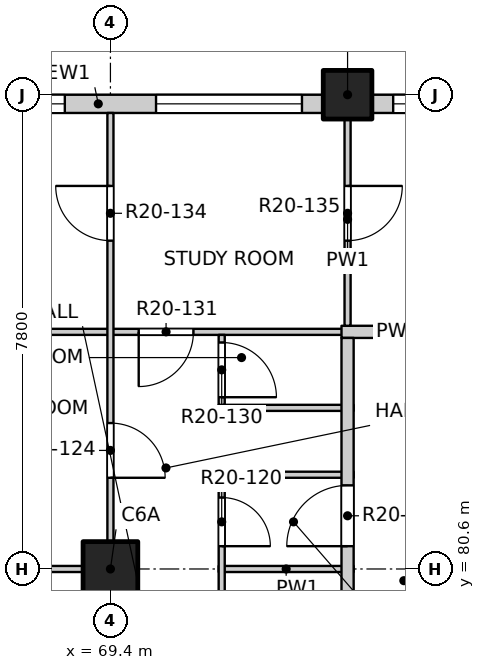
"""IFC4 building model, lengths in metres.
Left out: names, types, materials, properties, quantities, classifications, styles, units other than length and angle.
Written with IfcOpenShell. Run it as: python <this file> out.ifc"""

import sys

from ifc_helpers import new_model, si_unit, direction, frame, frame_2d, origin, origin_2d, place, context, subcontext, project, spatial, rectangle, extrude, element, fill, save


model = new_model("IFC4")
c1 = context("Model", 3, precision=1e-05, world=origin(), true_north=direction((0.0, 1.0)))
c2 = subcontext(c1, "Body", "Model", "MODEL_VIEW")
j1 = project(units=[si_unit("LENGTHUNIT", "METRE"), si_unit("PLANEANGLEUNIT", "RADIAN")], contexts=[c1])
p1 = place(None, origin())
s1 = spatial("IfcSite", under=j1, at=p1, CompositionType="ELEMENT")
p2 = place(p1, origin())
s2 = spatial("IfcBuilding", under=s1, at=p2, CompositionType="ELEMENT")
p3 = place(p2, frame((0.0, 0.0, 204.1)))
s3 = spatial("IfcBuildingStorey", under=s2, at=p3, CompositionType="ELEMENT", Elevation=204.1)
p4 = place(p3, frame((73.3, 88.4, -0.25), z_axis=(0.0, 0.0, 1.0), x_axis=(1.0, 0.0, 0.0)))
e1 = element("IfcColumn", 1, at=p4, inside=s3, PredefinedType="COLUMN", context=c2, shape_type="SweptSolid", body=[
    extrude(rectangle(XDim=0.8, YDim=0.8, at=origin_2d()), origin(), (0.0, 0.0, 1.0), 3.4),
])
p5 = place(p3, frame((69.4, 80.6, -0.25), z_axis=(0.0, 0.0, 1.0), x_axis=(1.0, 0.0, 0.0)))
e2 = element("IfcColumn", 2, at=p5, inside=s3, PredefinedType="COLUMN", context=c2, shape_type="SweptSolid", body=[
    extrude(rectangle(XDim=0.9, YDim=0.9, at=origin_2d()), origin(), (0.0, 0.0, 1.0), 3.4),
])
p6 = place(p3, frame((65.5, 88.25, 0.0), z_axis=(0.0, 0.0, 1.0), x_axis=(1.0, 0.0, 0.0)))
e3 = element("IfcWall", 3, at=p6, inside=s3, PredefinedType="SOLIDWALL", context=c2, shape_type="SweptSolid", body=[
    extrude(rectangle(XDim=7.4, YDim=0.3, at=frame_2d((3.7, 0.0))), origin(), (0.0, 0.0, 1.0), 2.7),
])
p7 = place(p6, frame((0.75, 0.0, 0.9)))
e4 = element("IfcOpeningElement", 4, at=p7, cuts=e3, PredefinedType="OPENING", context=c2, shape_type="SweptSolid", body=[
    extrude(rectangle(XDim=2.4, YDim=1.8, at=frame_2d((1.2, 0.9))), frame((0.0, 0.16, 0.0), z_axis=(0.0, -1.0, 0.0), x_axis=(1.0, 0.0, 0.0)), (0.0, 0.0, 1.0), 0.32),
])
p8 = place(p6, frame((4.65, 0.0, 0.9)))
e5 = element("IfcOpeningElement", 5, at=p8, cuts=e3, PredefinedType="OPENING", context=c2, shape_type="SweptSolid", body=[
    extrude(rectangle(XDim=2.4, YDim=1.8, at=frame_2d((1.2, 0.9))), frame((0.0, 0.16, 0.0), z_axis=(0.0, -1.0, 0.0), x_axis=(1.0, 0.0, 0.0)), (0.0, 0.0, 1.0), 0.32),
])
p9 = place(p3, frame((73.7, 88.25, 0.0), z_axis=(0.0, 0.0, 1.0), x_axis=(1.0, 0.0, 0.0)))
e6 = element("IfcWall", 6, at=p9, inside=s3, PredefinedType="SOLIDWALL", context=c2, shape_type="SweptSolid", body=[
    extrude(rectangle(XDim=22.6, YDim=0.3, at=frame_2d((11.3, 0.0))), origin(), (0.0, 0.0, 1.0), 2.7),
])
p10 = place(p9, frame((0.35, 0.0, 0.9)))
e7 = element("IfcOpeningElement", 7, at=p10, cuts=e6, PredefinedType="OPENING", context=c2, shape_type="SweptSolid", body=[
    extrude(rectangle(XDim=2.4, YDim=1.8, at=frame_2d((1.2, 0.9))), frame((0.0, 0.16, 0.0), z_axis=(0.0, -1.0, 0.0), x_axis=(1.0, 0.0, 0.0)), (0.0, 0.0, 1.0), 0.32),
])
p11 = place(p9, frame((4.25, 0.0, 0.9)))
e8 = element("IfcOpeningElement", 8, at=p11, cuts=e6, PredefinedType="OPENING", context=c2, shape_type="SweptSolid", body=[
    extrude(rectangle(XDim=2.4, YDim=1.8, at=frame_2d((1.2, 0.9))), frame((0.0, 0.16, 0.0), z_axis=(0.0, -1.0, 0.0), x_axis=(1.0, 0.0, 0.0)), (0.0, 0.0, 1.0), 0.32),
])
p12 = place(p9, frame((8.15, 0.0, 0.9)))
e9 = element("IfcOpeningElement", 9, at=p12, cuts=e6, PredefinedType="OPENING", context=c2, shape_type="SweptSolid", body=[
    extrude(rectangle(XDim=2.4, YDim=1.8, at=frame_2d((1.2, 0.9))), frame((0.0, 0.16, 0.0), z_axis=(0.0, -1.0, 0.0), x_axis=(1.0, 0.0, 0.0)), (0.0, 0.0, 1.0), 0.32),
])
p13 = place(p9, frame((12.05, 0.0, 0.9)))
e10 = element("IfcOpeningElement", 10, at=p13, cuts=e6, PredefinedType="OPENING", context=c2, shape_type="SweptSolid", body=[
    extrude(rectangle(XDim=2.4, YDim=1.8, at=frame_2d((1.2, 0.9))), frame((0.0, 0.16, 0.0), z_axis=(0.0, -1.0, 0.0), x_axis=(1.0, 0.0, 0.0)), (0.0, 0.0, 1.0), 0.32),
])
p14 = place(p9, frame((15.95, 0.0, 0.9)))
e11 = element("IfcOpeningElement", 11, at=p14, cuts=e6, PredefinedType="OPENING", context=c2, shape_type="SweptSolid", body=[
    extrude(rectangle(XDim=2.4, YDim=1.8, at=frame_2d((1.2, 0.9))), frame((0.0, 0.16, 0.0), z_axis=(0.0, -1.0, 0.0), x_axis=(1.0, 0.0, 0.0)), (0.0, 0.0, 1.0), 0.32),
])
p15 = place(p9, frame((19.85, 0.0, 0.9)))
e12 = element("IfcOpeningElement", 12, at=p15, cuts=e6, PredefinedType="OPENING", context=c2, shape_type="SweptSolid", body=[
    extrude(rectangle(XDim=2.4, YDim=1.8, at=frame_2d((1.2, 0.9))), frame((0.0, 0.16, 0.0), z_axis=(0.0, -1.0, 0.0), x_axis=(1.0, 0.0, 0.0)), (0.0, 0.0, 1.0), 0.32),
])
p16 = place(p3, frame((61.9, 80.6, 0.0), z_axis=(0.0, 0.0, 1.0), x_axis=(1.0, 0.0, 0.0)))
e13 = element("IfcWall", 13, at=p16, inside=s3, PredefinedType="PARTITIONING", context=c2, shape_type="SweptSolid", body=[
    extrude(rectangle(XDim=7.55, YDim=0.1, at=frame_2d((3.775, 0.0))), origin(), (0.0, 0.0, 1.0), 3.15),
])
for number, where, z_axis, x_axis in (
    (14, (71.18, 80.6, 0.0), (0.0, 0.0, 1.0), (1.0, 0.0, 0.0)),
    (15, (71.18, 82.15, 0.0), (0.0, 0.0, 1.0), (1.0, 0.0, 0.0)),
    (16, (71.18, 83.25, 0.0), (0.0, 0.0, 1.0), (1.0, 0.0, 0.0)),
):
    element("IfcWall", number, at=place(p3, frame(where, z_axis=z_axis, x_axis=x_axis)), inside=s3, PredefinedType="PARTITIONING", context=c2, shape_type="SweptSolid", body=[
        extrude(rectangle(XDim=2.22, YDim=0.1, at=frame_2d((1.11, 0.0))), origin(), (0.0, 0.0, 1.0), 3.15),
    ])
p17 = place(p3, frame((61.9, 84.5, 0.0), z_axis=(0.0, 0.0, 1.0), x_axis=(1.0, 0.0, 0.0)))
e17 = element("IfcWall", 17, at=p17, inside=s3, PredefinedType="PARTITIONING", context=c2, shape_type="SweptSolid", body=[
    extrude(rectangle(XDim=11.5, YDim=0.1, at=frame_2d((5.75, 0.0))), origin(), (0.0, 0.0, 1.0), 3.15),
])
p18 = place(p17, frame((7.965, 0.0, 0.0)))
e18 = element("IfcOpeningElement", 18, at=p18, cuts=e17, PredefinedType="OPENING", context=c2, shape_type="SweptSolid", body=[
    extrude(rectangle(XDim=0.9, YDim=2.1, at=frame_2d((0.45, 1.05))), frame((0.0, 0.06, 0.0), z_axis=(0.0, -1.0, 0.0), x_axis=(1.0, 0.0, 0.0)), (0.0, 0.0, 1.0), 0.12),
])
p19 = place(p3, frame((73.2, 84.5, 0.0), z_axis=(0.0, 0.0, 1.0), x_axis=(1.0, 0.0, 0.0)))
e19 = element("IfcWall", 19, at=p19, inside=s3, PredefinedType="PARTITIONING", context=c2, shape_type="SweptSolid", body=[
    extrude(rectangle(XDim=1.85, YDim=0.2, at=frame_2d((0.925, 0.0))), origin(), (0.0, 0.0, 1.0), 3.15),
])
p20 = place(p3, frame((69.4, 41.9, 0.0), z_axis=(0.0, 0.0, 1.0), x_axis=(0.0, 1.0, 0.0)))
e20 = element("IfcWall", 20, at=p20, inside=s3, PredefinedType="PARTITIONING", context=c2, shape_type="SweptSolid", body=[
    extrude(rectangle(XDim=46.2, YDim=0.1, at=frame_2d((23.1, 0.0))), origin(), (0.0, 0.0, 1.0), 3.15),
])
p21 = place(p20, frame((1.2, 0.0, 0.0)))
e21 = element("IfcOpeningElement", 21, at=p21, cuts=e20, PredefinedType="OPENING", context=c2, shape_type="SweptSolid", body=[
    extrude(rectangle(XDim=0.9, YDim=2.1, at=frame_2d((0.45, 1.05))), frame((0.0, 0.06, 0.0), z_axis=(0.0, -1.0, 0.0), x_axis=(1.0, 0.0, 0.0)), (0.0, 0.0, 1.0), 0.12),
])
p22 = place(p20, frame((5.1, 0.0, 0.0)))
e22 = element("IfcOpeningElement", 22, at=p22, cuts=e20, PredefinedType="OPENING", context=c2, shape_type="SweptSolid", body=[
    extrude(rectangle(XDim=0.9, YDim=2.1, at=frame_2d((0.45, 1.05))), frame((0.0, 0.06, 0.0), z_axis=(0.0, -1.0, 0.0), x_axis=(1.0, 0.0, 0.0)), (0.0, 0.0, 1.0), 0.12),
])
p23 = place(p20, frame((9.975, 0.0, 0.0)))
e23 = element("IfcOpeningElement", 23, at=p23, cuts=e20, PredefinedType="OPENING", context=c2, shape_type="SweptSolid", body=[
    extrude(rectangle(XDim=0.9, YDim=2.1, at=frame_2d((0.45, 1.05))), frame((0.0, 0.06, 0.0), z_axis=(0.0, -1.0, 0.0), x_axis=(1.0, 0.0, 0.0)), (0.0, 0.0, 1.0), 0.12),
])
p24 = place(p20, frame((12.9, 0.0, 0.0)))
e24 = element("IfcOpeningElement", 24, at=p24, cuts=e20, PredefinedType="OPENING", context=c2, shape_type="SweptSolid", body=[
    extrude(rectangle(XDim=0.9, YDim=2.1, at=frame_2d((0.45, 1.05))), frame((0.0, 0.06, 0.0), z_axis=(0.0, -1.0, 0.0), x_axis=(1.0, 0.0, 0.0)), (0.0, 0.0, 1.0), 0.12),
])
p25 = place(p20, frame((17.775, 0.0, 0.0)))
e25 = element("IfcOpeningElement", 25, at=p25, cuts=e20, PredefinedType="OPENING", context=c2, shape_type="SweptSolid", body=[
    extrude(rectangle(XDim=0.9, YDim=2.1, at=frame_2d((0.45, 1.05))), frame((0.0, 0.06, 0.0), z_axis=(0.0, -1.0, 0.0), x_axis=(1.0, 0.0, 0.0)), (0.0, 0.0, 1.0), 0.12),
])
p26 = place(p20, frame((21.625, 0.0, 0.0)))
e26 = element("IfcOpeningElement", 26, at=p26, cuts=e20, PredefinedType="OPENING", context=c2, shape_type="SweptSolid", body=[
    extrude(rectangle(XDim=0.9, YDim=2.1, at=frame_2d((0.45, 1.05))), frame((0.0, 0.06, 0.0), z_axis=(0.0, -1.0, 0.0), x_axis=(1.0, 0.0, 0.0)), (0.0, 0.0, 1.0), 0.12),
])
p27 = place(p20, frame((24.6, 0.0, 0.0)))
e27 = element("IfcOpeningElement", 27, at=p27, cuts=e20, PredefinedType="OPENING", context=c2, shape_type="SweptSolid", body=[
    extrude(rectangle(XDim=0.9, YDim=2.1, at=frame_2d((0.45, 1.05))), frame((0.0, 0.06, 0.0), z_axis=(0.0, -1.0, 0.0), x_axis=(1.0, 0.0, 0.0)), (0.0, 0.0, 1.0), 0.12),
])
p28 = place(p20, frame((28.5, 0.0, 0.0)))
e28 = element("IfcOpeningElement", 28, at=p28, cuts=e20, PredefinedType="OPENING", context=c2, shape_type="SweptSolid", body=[
    extrude(rectangle(XDim=0.9, YDim=2.1, at=frame_2d((0.45, 1.05))), frame((0.0, 0.06, 0.0), z_axis=(0.0, -1.0, 0.0), x_axis=(1.0, 0.0, 0.0)), (0.0, 0.0, 1.0), 0.12),
])
p29 = place(p20, frame((33.375, 0.0, 0.0)))
e29 = element("IfcOpeningElement", 29, at=p29, cuts=e20, PredefinedType="OPENING", context=c2, shape_type="SweptSolid", body=[
    extrude(rectangle(XDim=0.9, YDim=2.1, at=frame_2d((0.45, 1.05))), frame((0.0, 0.06, 0.0), z_axis=(0.0, -1.0, 0.0), x_axis=(1.0, 0.0, 0.0)), (0.0, 0.0, 1.0), 0.12),
])
p30 = place(p20, frame((37.225, 0.0, 0.0)))
e30 = element("IfcOpeningElement", 30, at=p30, cuts=e20, PredefinedType="OPENING", context=c2, shape_type="SweptSolid", body=[
    extrude(rectangle(XDim=0.9, YDim=2.1, at=frame_2d((0.45, 1.05))), frame((0.0, 0.06, 0.0), z_axis=(0.0, -1.0, 0.0), x_axis=(1.0, 0.0, 0.0)), (0.0, 0.0, 1.0), 0.12),
])
p31 = place(p20, frame((40.2, 0.0, 0.0)))
e31 = element("IfcOpeningElement", 31, at=p31, cuts=e20, PredefinedType="OPENING", context=c2, shape_type="SweptSolid", body=[
    extrude(rectangle(XDim=0.9, YDim=2.1, at=frame_2d((0.45, 1.05))), frame((0.0, 0.06, 0.0), z_axis=(0.0, -1.0, 0.0), x_axis=(1.0, 0.0, 0.0)), (0.0, 0.0, 1.0), 0.12),
])
p32 = place(p20, frame((44.1, 0.0, 0.0)))
e32 = element("IfcOpeningElement", 32, at=p32, cuts=e20, PredefinedType="OPENING", context=c2, shape_type="SweptSolid", body=[
    extrude(rectangle(XDim=0.9, YDim=2.1, at=frame_2d((0.45, 1.05))), frame((0.0, 0.06, 0.0), z_axis=(0.0, -1.0, 0.0), x_axis=(1.0, 0.0, 0.0)), (0.0, 0.0, 1.0), 0.12),
])
p33 = place(p3, frame((71.23, 74.5, 0.0), z_axis=(0.0, 0.0, 1.0), x_axis=(0.0, 1.0, 0.0)))
e33 = element("IfcWall", 33, at=p33, inside=s3, PredefinedType="PARTITIONING", context=c2, shape_type="SweptSolid", body=[
    extrude(rectangle(XDim=7.6, YDim=0.1, at=frame_2d((3.8, 0.0))), origin(), (0.0, 0.0, 1.0), 3.15),
])
p34 = place(p33, frame((0.625, 0.0, 0.0)))
e34 = element("IfcOpeningElement", 34, at=p34, cuts=e33, PredefinedType="OPENING", context=c2, shape_type="SweptSolid", body=[
    extrude(rectangle(XDim=0.9, YDim=2.1, at=frame_2d((0.45, 1.05))), frame((0.0, 0.06, 0.0), z_axis=(0.0, -1.0, 0.0), x_axis=(1.0, 0.0, 0.0)), (0.0, 0.0, 1.0), 0.12),
])
p35 = place(p33, frame((2.835, 0.0, 0.0)))
e35 = element("IfcOpeningElement", 35, at=p35, cuts=e33, PredefinedType="OPENING", context=c2, shape_type="SweptSolid", body=[
    extrude(rectangle(XDim=0.9, YDim=2.1, at=frame_2d((0.45, 1.05))), frame((0.0, 0.06, 0.0), z_axis=(0.0, -1.0, 0.0), x_axis=(1.0, 0.0, 0.0)), (0.0, 0.0, 1.0), 0.12),
])
p36 = place(p33, frame((4.785, 0.0, 0.0)))
e36 = element("IfcOpeningElement", 36, at=p36, cuts=e33, PredefinedType="OPENING", context=c2, shape_type="SweptSolid", body=[
    extrude(rectangle(XDim=0.9, YDim=2.1, at=frame_2d((0.45, 1.05))), frame((0.0, 0.06, 0.0), z_axis=(0.0, -1.0, 0.0), x_axis=(1.0, 0.0, 0.0)), (0.0, 0.0, 1.0), 0.12),
])
p37 = place(p33, frame((6.475, 0.0, 0.0)))
e37 = element("IfcOpeningElement", 37, at=p37, cuts=e33, PredefinedType="OPENING", context=c2, shape_type="SweptSolid", body=[
    extrude(rectangle(XDim=0.8, YDim=2.1, at=frame_2d((0.4, 1.05))), frame((0.0, 0.06, 0.0), z_axis=(0.0, -1.0, 0.0), x_axis=(1.0, 0.0, 0.0)), (0.0, 0.0, 1.0), 0.12),
])
p38 = place(p3, frame((71.23, 83.3, 0.0), z_axis=(0.0, 0.0, 1.0), x_axis=(0.0, 1.0, 0.0)))
e38 = element("IfcWall", 38, at=p38, inside=s3, PredefinedType="PARTITIONING", context=c2, shape_type="SweptSolid", body=[
    extrude(rectangle(XDim=1.15, YDim=0.1, at=frame_2d((0.575, 0.0))), origin(), (0.0, 0.0, 1.0), 3.15),
])
p39 = place(p38, frame((0.125, 0.0, 0.0)))
e39 = element("IfcOpeningElement", 39, at=p39, cuts=e38, PredefinedType="OPENING", context=c2, shape_type="SweptSolid", body=[
    extrude(rectangle(XDim=0.9, YDim=2.1, at=frame_2d((0.45, 1.05))), frame((0.0, 0.06, 0.0), z_axis=(0.0, -1.0, 0.0), x_axis=(1.0, 0.0, 0.0)), (0.0, 0.0, 1.0), 0.12),
])
p40 = place(p3, frame((73.3, 49.5, 0.0), z_axis=(0.0, 0.0, 1.0), x_axis=(0.0, 1.0, 0.0)))
e40 = element("IfcWall", 40, at=p40, inside=s3, PredefinedType="PARTITIONING", context=c2, shape_type="SweptSolid", body=[
    extrude(rectangle(XDim=34.9, YDim=0.2, at=frame_2d((17.45, 0.0))), origin(), (0.0, 0.0, 1.0), 3.15),
])
p41 = place(p40, frame((3.225, 0.0, 0.0)))
e41 = element("IfcOpeningElement", 41, at=p41, cuts=e40, PredefinedType="OPENING", context=c2, shape_type="SweptSolid", body=[
    extrude(rectangle(XDim=1.0, YDim=2.1, at=frame_2d((0.5, 1.05))), frame((0.0, 0.11, 0.0), z_axis=(0.0, -1.0, 0.0), x_axis=(1.0, 0.0, 0.0)), (0.0, 0.0, 1.0), 0.22),
])
p42 = place(p40, frame((25.125, 0.0, 0.0)))
e42 = element("IfcOpeningElement", 42, at=p42, cuts=e40, PredefinedType="OPENING", context=c2, shape_type="SweptSolid", body=[
    extrude(rectangle(XDim=1.0, YDim=2.1, at=frame_2d((0.5, 1.05))), frame((0.0, 0.11, 0.0), z_axis=(0.0, -1.0, 0.0), x_axis=(1.0, 0.0, 0.0)), (0.0, 0.0, 1.0), 0.22),
])
p43 = place(p40, frame((31.475, 0.0, 0.0)))
e43 = element("IfcOpeningElement", 43, at=p43, cuts=e40, PredefinedType="OPENING", context=c2, shape_type="SweptSolid", body=[
    extrude(rectangle(XDim=1.0, YDim=2.1, at=frame_2d((0.5, 1.05))), frame((0.0, 0.11, 0.0), z_axis=(0.0, -1.0, 0.0), x_axis=(1.0, 0.0, 0.0)), (0.0, 0.0, 1.0), 0.22),
])
p44 = place(p3, frame((73.3, 84.6, 0.0), z_axis=(0.0, 0.0, 1.0), x_axis=(0.0, 1.0, 0.0)))
e44 = element("IfcWall", 44, at=p44, inside=s3, PredefinedType="PARTITIONING", context=c2, shape_type="SweptSolid", body=[
    extrude(rectangle(XDim=3.5, YDim=0.1, at=frame_2d((1.75, 0.0))), origin(), (0.0, 0.0, 1.0), 3.15),
])
p45 = place(p44, frame((1.4, 0.0, 0.0)))
e45 = element("IfcOpeningElement", 45, at=p45, cuts=e44, PredefinedType="OPENING", context=c2, shape_type="SweptSolid", body=[
    extrude(rectangle(XDim=0.9, YDim=2.1, at=frame_2d((0.45, 1.05))), frame((0.0, 0.06, 0.0), z_axis=(0.0, -1.0, 0.0), x_axis=(1.0, 0.0, 0.0)), (0.0, 0.0, 1.0), 0.12),
])
p46 = place(p7, origin())
e46 = element("IfcWindow", 46, at=p46, inside=s3, PartitioningType="DOUBLE_PANEL_VERTICAL", PredefinedType="WINDOW", context=c2, shape_type="SweptSolid", body=[
    extrude(rectangle(XDim=2.4, YDim=1.8, at=frame_2d((1.2, 0.9))), frame((0.0, 0.03, 0.0), z_axis=(0.0, -1.0, 0.0), x_axis=(1.0, 0.0, 0.0)), (0.0, 0.0, 1.0), 0.06),
])
fill(e4, e46)
p47 = place(p8, origin())
e47 = element("IfcWindow", 47, at=p47, inside=s3, PartitioningType="DOUBLE_PANEL_VERTICAL", PredefinedType="WINDOW", context=c2, shape_type="SweptSolid", body=[
    extrude(rectangle(XDim=2.4, YDim=1.8, at=frame_2d((1.2, 0.9))), frame((0.0, 0.03, 0.0), z_axis=(0.0, -1.0, 0.0), x_axis=(1.0, 0.0, 0.0)), (0.0, 0.0, 1.0), 0.06),
])
fill(e5, e47)
p48 = place(p10, origin())
e48 = element("IfcWindow", 48, at=p48, inside=s3, PartitioningType="DOUBLE_PANEL_VERTICAL", PredefinedType="WINDOW", context=c2, shape_type="SweptSolid", body=[
    extrude(rectangle(XDim=2.4, YDim=1.8, at=frame_2d((1.2, 0.9))), frame((0.0, 0.03, 0.0), z_axis=(0.0, -1.0, 0.0), x_axis=(1.0, 0.0, 0.0)), (0.0, 0.0, 1.0), 0.06),
])
fill(e7, e48)
p49 = place(p37, origin())
e49 = element("IfcDoor", 49, at=p49, inside=s3, OperationType="SINGLE_SWING_RIGHT", PredefinedType="DOOR", context=c2, shape_type="SweptSolid", body=[
    extrude(rectangle(XDim=0.8, YDim=2.1, at=frame_2d((0.4, 1.05))), frame((0.0, 0.025, 0.0), z_axis=(0.0, -1.0, 0.0), x_axis=(1.0, 0.0, 0.0)), (0.0, 0.0, 1.0), 0.05),
])
fill(e37, e49)
p50 = place(p43, origin())
e50 = element("IfcDoor", 50, at=p50, inside=s3, OperationType="SINGLE_SWING_LEFT", PredefinedType="DOOR", context=c2, shape_type="SweptSolid", body=[
    extrude(rectangle(XDim=1.0, YDim=2.1, at=frame_2d((0.5, 1.05))), frame((0.0, 0.025, 0.0), z_axis=(0.0, -1.0, 0.0), x_axis=(1.0, 0.0, 0.0)), (0.0, 0.0, 1.0), 0.05),
])
fill(e43, e50)
p51 = place(p31, origin())
e51 = element("IfcDoor", 51, at=p51, inside=s3, OperationType="SINGLE_SWING_RIGHT", PredefinedType="DOOR", context=c2, shape_type="SweptSolid", body=[
    extrude(rectangle(XDim=0.9, YDim=2.1, at=frame_2d((0.45, 1.05))), frame((0.0, 0.025, 0.0), z_axis=(0.0, -1.0, 0.0), x_axis=(1.0, 0.0, 0.0)), (0.0, 0.0, 1.0), 0.05),
])
fill(e31, e51)
p52 = place(p39, origin())
e52 = element("IfcDoor", 52, at=p52, inside=s3, OperationType="SINGLE_SWING_RIGHT", PredefinedType="DOOR", context=c2, shape_type="SweptSolid", body=[
    extrude(rectangle(XDim=0.9, YDim=2.1, at=frame_2d((0.45, 1.05))), frame((0.0, 0.025, 0.0), z_axis=(0.0, -1.0, 0.0), x_axis=(1.0, 0.0, 0.0)), (0.0, 0.0, 1.0), 0.05),
])
fill(e39, e52)
p53 = place(p18, origin())
e53 = element("IfcDoor", 53, at=p53, inside=s3, OperationType="SINGLE_SWING_RIGHT", PredefinedType="DOOR", context=c2, shape_type="SweptSolid", body=[
    extrude(rectangle(XDim=0.9, YDim=2.1, at=frame_2d((0.45, 1.05))), frame((0.0, 0.025, 0.0), z_axis=(0.0, -1.0, 0.0), x_axis=(1.0, 0.0, 0.0)), (0.0, 0.0, 1.0), 0.05),
])
fill(e18, e53)
p54 = place(p32, origin())
e54 = element("IfcDoor", 54, at=p54, inside=s3, OperationType="SINGLE_SWING_RIGHT", PredefinedType="DOOR", context=c2, shape_type="SweptSolid", body=[
    extrude(rectangle(XDim=0.9, YDim=2.1, at=frame_2d((0.45, 1.05))), frame((0.0, 0.025, 0.0), z_axis=(0.0, -1.0, 0.0), x_axis=(1.0, 0.0, 0.0)), (0.0, 0.0, 1.0), 0.05),
])
fill(e32, e54)
p55 = place(p45, origin())
e55 = element("IfcDoor", 55, at=p55, inside=s3, OperationType="SINGLE_SWING_LEFT", PredefinedType="DOOR", context=c2, shape_type="SweptSolid", body=[
    extrude(rectangle(XDim=0.9, YDim=2.1, at=frame_2d((0.45, 1.05))), frame((0.0, 0.025, 0.0), z_axis=(0.0, -1.0, 0.0), x_axis=(1.0, 0.0, 0.0)), (0.0, 0.0, 1.0), 0.05),
])
fill(e45, e55)
save(model, sys.argv[1])
